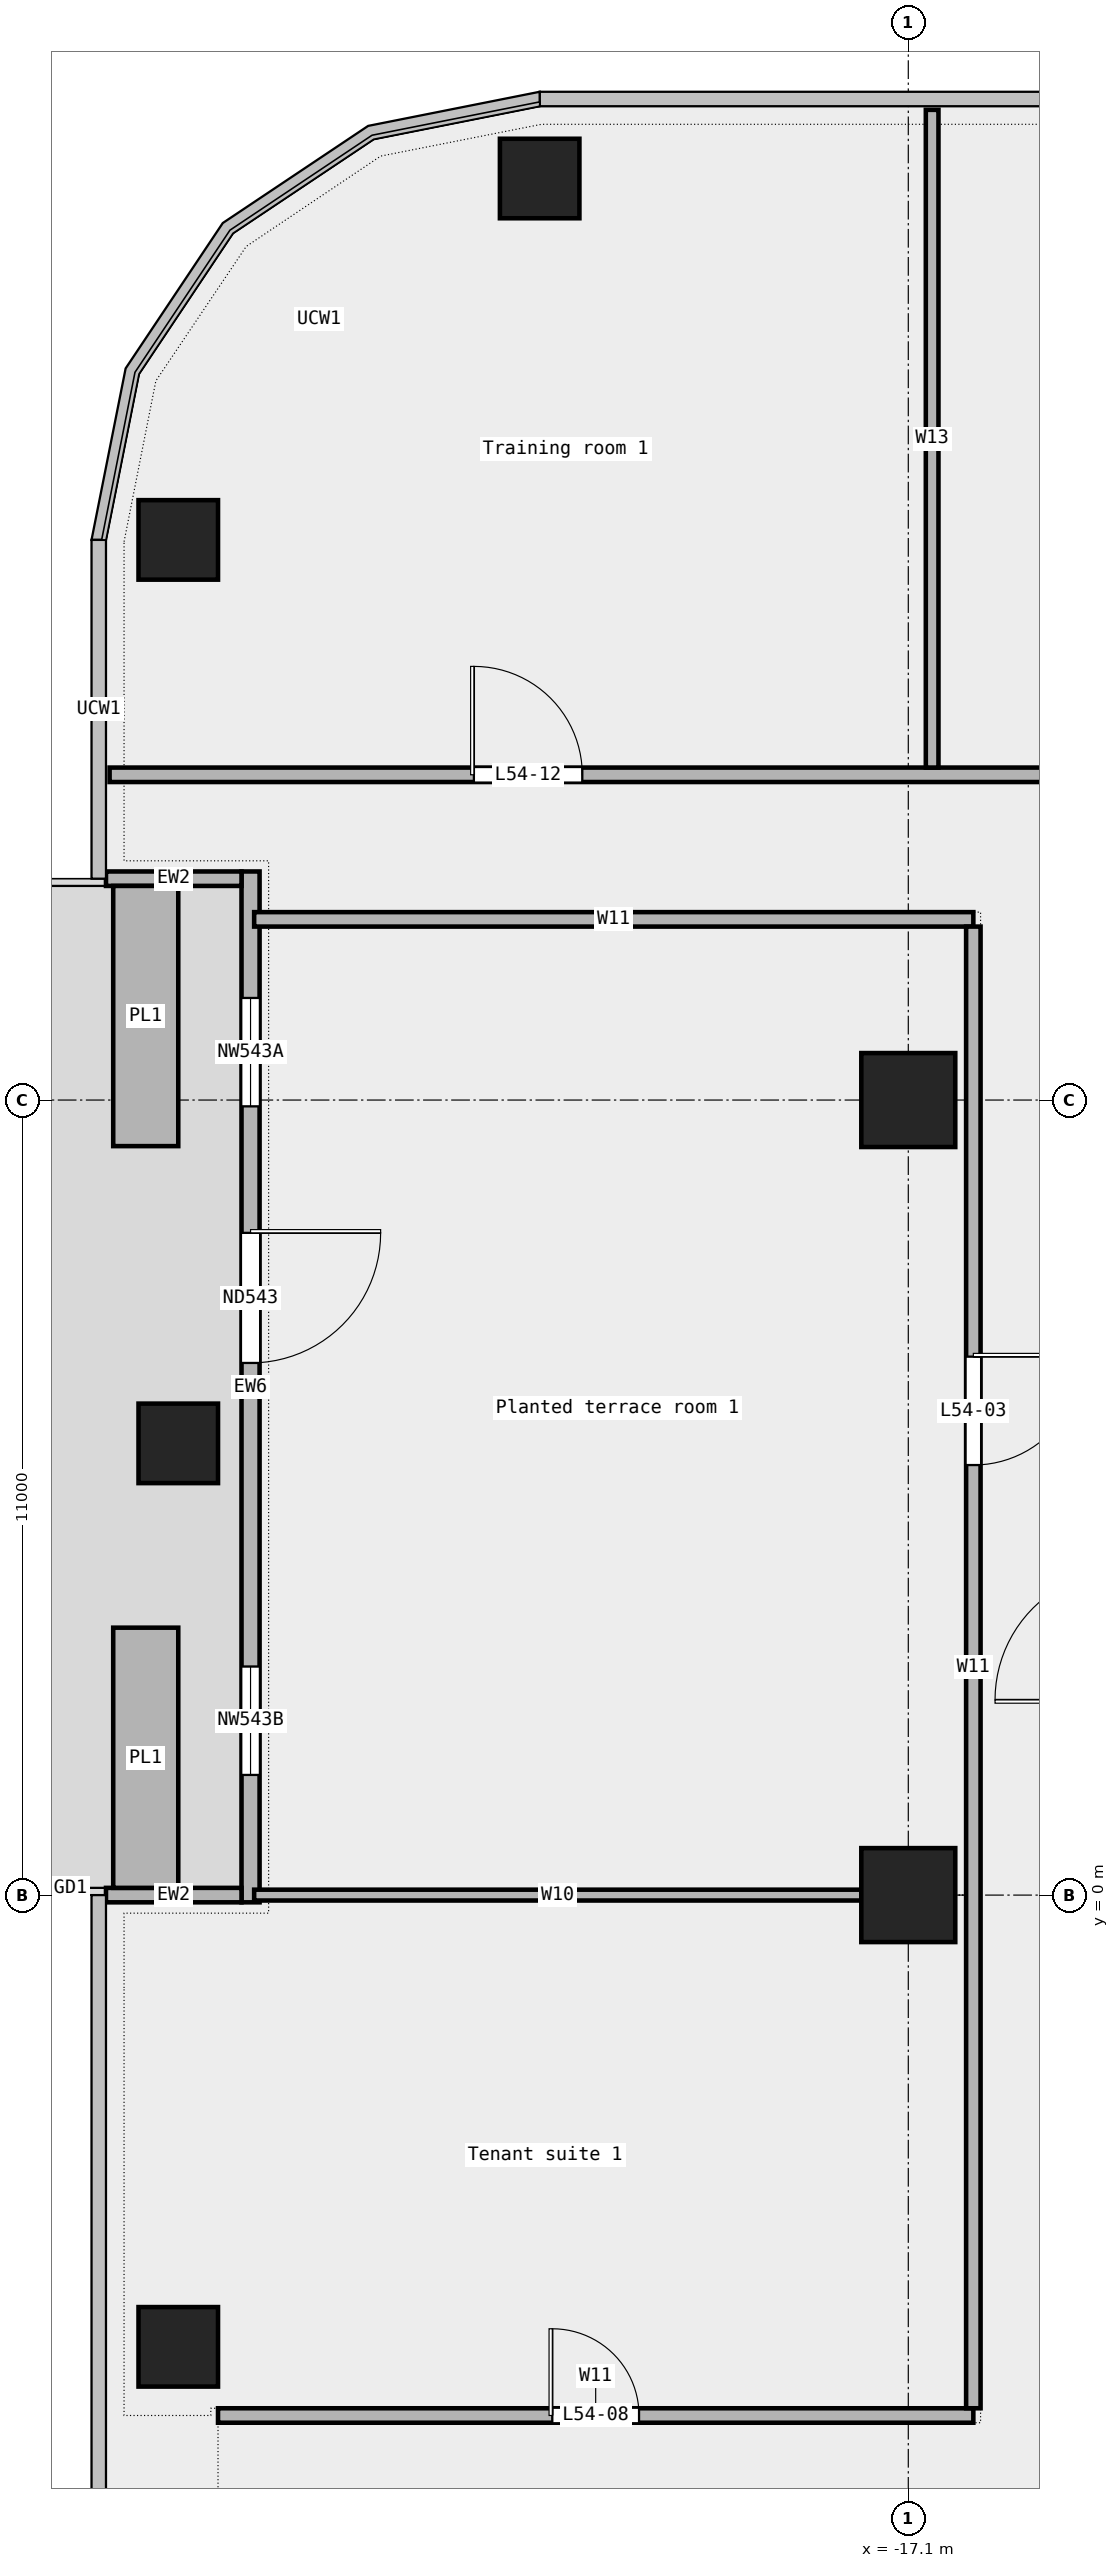
"""IFC4 building model, lengths in metres.
Left out: names, types, materials, properties, quantities, classifications, styles, units other than length and angle.
Written with IfcOpenShell. Run it as: python <this file> out.ifc"""

import sys

from ifc_helpers import new_model, si_unit, direction, frame, frame_2d, origin, origin_2d, place, context, subcontext, project, spatial, rectangle, extrude, element, fill, save


model = new_model("IFC4")
c1 = context("Model", 3, precision=1e-05, world=origin(), true_north=direction((0.0, 1.0)))
c2 = subcontext(c1, "Body", "Model", "MODEL_VIEW")
j1 = project(units=[si_unit("LENGTHUNIT", "METRE"), si_unit("PLANEANGLEUNIT", "RADIAN")], contexts=[c1])
p1 = place(None, origin())
s1 = spatial("IfcSite", under=j1, at=p1, CompositionType="ELEMENT")
p2 = place(p1, origin())
s2 = spatial("IfcBuilding", under=s1, at=p2, CompositionType="ELEMENT")
p3 = place(p2, frame((0.0, 0.0, 251.0)))
s3 = spatial("IfcBuildingStorey", under=s2, at=p3, CompositionType="ELEMENT", Elevation=251.0)
for number, where, z_axis, x_axis in (
    (1, (-22.2, 23.75, 0.0), (0.0, 0.0, 1.0), (1.0, 0.0, 0.0)),
    (2, (-27.2, 18.75, 0.0), (0.0, 0.0, 1.0), (1.0, 0.0, 0.0)),
    (3, (-27.2, 6.25, 0.0), (0.0, 0.0, 1.0), (1.0, 0.0, 0.0)),
    (4, (-27.2, -6.25, 0.0), (0.0, 0.0, 1.0), (1.0, 0.0, 0.0)),
):
    element("IfcColumn", number, at=place(p3, frame(where, z_axis=z_axis, x_axis=x_axis)), inside=s3, PredefinedType="COLUMN", context=c2, shape_type="SweptSolid", body=[
        extrude(rectangle(XDim=1.1, YDim=1.1, at=origin_2d()), origin(), (0.0, 0.0, 1.0), 3.6),
    ])
for number, where, z_axis, x_axis in (
    (5, (-17.1, 0.0, 0.0), (0.0, 0.0, 1.0), (1.0, 0.0, 0.0)),
    (6, (-17.1, 11.0, 0.0), (0.0, 0.0, 1.0), (1.0, 0.0, 0.0)),
):
    element("IfcColumn", number, at=place(p3, frame(where, z_axis=z_axis, x_axis=x_axis)), inside=s3, PredefinedType="COLUMN", context=c2, shape_type="SweptSolid", body=[
        extrude(rectangle(XDim=1.3, YDim=1.3, at=origin_2d()), origin(), (0.0, 0.0, 1.0), 3.6),
    ])
p4 = place(p3, frame((-26.2, 14.163, 0.0), z_axis=(0.0, 0.0, 1.0), x_axis=(0.0, -1.0, 0.0)))
e7 = element("IfcWall", 7, at=p4, inside=s3, PredefinedType="STANDARD", context=c2, shape_type="SweptSolid", body=[
    extrude(rectangle(XDim=14.263, YDim=0.25, at=frame_2d((7.131, 0.0))), origin(), (0.0, 0.0, 1.0), 3.6),
])
p5 = place(p4, frame((1.75, 0.0, 0.45)))
e8 = element("IfcOpeningElement", 8, at=p5, cuts=e7, PredefinedType="OPENING", context=c2, shape_type="SweptSolid", body=[
    extrude(rectangle(XDim=1.5, YDim=2.4, at=frame_2d((0.75, 1.2))), frame((0.0, 0.137, 0.0), z_axis=(0.0, -1.0, 0.0), x_axis=(1.0, 0.0, 0.0)), (0.0, 0.0, 1.0), 0.274),
])
p6 = place(p4, frame((5.0, 0.0, 0.0)))
e9 = element("IfcOpeningElement", 9, at=p6, cuts=e7, PredefinedType="OPENING", context=c2, shape_type="SweptSolid", body=[
    extrude(rectangle(XDim=1.8, YDim=2.4, at=frame_2d((0.9, 1.2))), frame((0.0, 0.137, 0.0), z_axis=(0.0, -1.0, 0.0), x_axis=(1.0, 0.0, 0.0)), (0.0, 0.0, 1.0), 0.274),
])
p7 = place(p4, frame((11.0, 0.0, 0.45)))
e10 = element("IfcOpeningElement", 10, at=p7, cuts=e7, PredefinedType="OPENING", context=c2, shape_type="SweptSolid", body=[
    extrude(rectangle(XDim=1.5, YDim=2.4, at=frame_2d((0.75, 1.2))), frame((0.0, 0.137, 0.0), z_axis=(0.0, -1.0, 0.0), x_axis=(1.0, 0.0, 0.0)), (0.0, 0.0, 1.0), 0.274),
])
for number, where, z_axis, x_axis in (
    (11, (-28.2, 14.062, 0.0), (0.0, 0.0, 1.0), (1.0, 0.0, 0.0)),
    (12, (-28.2, 0.0, 0.0), (0.0, 0.0, 1.0), (1.0, 0.0, 0.0)),
):
    element("IfcWall", number, at=place(p3, frame(where, z_axis=z_axis, x_axis=x_axis)), inside=s3, PredefinedType="STANDARD", context=c2, shape_type="SweptSolid", body=[
        extrude(rectangle(XDim=1.875, YDim=0.2, at=frame_2d((0.938, 0.0))), origin(), (0.0, 0.0, 1.0), 3.6),
    ])
for number, where, z_axis, x_axis in (
    (13, (-27.65, 13.962, 0.0), (0.0, 0.0, 1.0), (0.0, -1.0, 0.0)),
    (14, (-27.65, 3.7, 0.0), (0.0, 0.0, 1.0), (0.0, -1.0, 0.0)),
):
    element("IfcWall", number, at=place(p3, frame(where, z_axis=z_axis, x_axis=x_axis)), inside=s3, PredefinedType="STANDARD", context=c2, shape_type="SweptSolid", body=[
        extrude(rectangle(XDim=3.6, YDim=0.9, at=frame_2d((1.8, 0.0))), origin(), (0.0, 0.0, 1.0), 0.7),
    ])
p8 = place(p3, frame((-26.65, -7.2, 0.0), z_axis=(0.0, 0.0, 1.0), x_axis=(1.0, 0.0, 0.0)))
e15 = element("IfcWall", 15, at=p8, inside=s3, PredefinedType="PARTITIONING", context=c2, shape_type="SweptSolid", body=[
    extrude(rectangle(XDim=10.45, YDim=0.2, at=frame_2d((5.225, 0.0))), origin(), (0.0, 0.0, 1.0), 3.6),
])
p9 = place(p8, frame((4.625, 0.0, 0.0)))
e16 = element("IfcOpeningElement", 16, at=p9, cuts=e15, PredefinedType="OPENING", context=c2, shape_type="SweptSolid", body=[
    extrude(rectangle(XDim=1.2, YDim=2.1, at=frame_2d((0.6, 1.05))), frame((0.0, 0.112, 0.0), z_axis=(0.0, -1.0, 0.0), x_axis=(1.0, 0.0, 0.0)), (0.0, 0.0, 1.0), 0.224),
])
p10 = place(p3, frame((-26.15, 0.0, 0.0), z_axis=(0.0, 0.0, 1.0), x_axis=(1.0, 0.0, 0.0)))
e17 = element("IfcWall", 17, at=p10, inside=s3, PredefinedType="PARTITIONING", context=c2, shape_type="SweptSolid", body=[
    extrude(rectangle(XDim=8.4, YDim=0.15, at=frame_2d((4.2, 0.0))), origin(), (0.0, 0.0, 1.0), 3.6),
])
p11 = place(p3, frame((-26.15, 13.5, 0.0), z_axis=(0.0, 0.0, 1.0), x_axis=(1.0, 0.0, 0.0)))
e18 = element("IfcWall", 18, at=p11, inside=s3, PredefinedType="PARTITIONING", context=c2, shape_type="SweptSolid", body=[
    extrude(rectangle(XDim=9.95, YDim=0.2, at=frame_2d((4.975, 0.0))), origin(), (0.0, 0.0, 1.0), 3.6),
])
p12 = place(p3, frame((-28.15, 15.5, 0.0), z_axis=(0.0, 0.0, 1.0), x_axis=(1.0, 0.0, 0.0)))
e19 = element("IfcWall", 19, at=p12, inside=s3, PredefinedType="PARTITIONING", context=c2, shape_type="SweptSolid", body=[
    extrude(rectangle(XDim=56.3, YDim=0.2, at=frame_2d((28.15, 0.0))), origin(), (0.0, 0.0, 1.0), 3.6),
])
p13 = place(p12, frame((50.405, 0.0, 0.0)))
e20 = element("IfcOpeningElement", 20, at=p13, cuts=e19, PredefinedType="OPENING", context=c2, shape_type="SweptSolid", body=[
    extrude(rectangle(XDim=1.2, YDim=2.1, at=frame_2d((0.6, 1.05))), frame((0.0, 0.112, 0.0), z_axis=(0.0, -1.0, 0.0), x_axis=(1.0, 0.0, 0.0)), (0.0, 0.0, 1.0), 0.224),
])
p14 = place(p12, frame((38.5, 0.0, 0.0)))
e21 = element("IfcOpeningElement", 21, at=p14, cuts=e19, PredefinedType="OPENING", context=c2, shape_type="SweptSolid", body=[
    extrude(rectangle(XDim=1.5, YDim=2.1, at=frame_2d((0.75, 1.05))), frame((0.0, 0.112, 0.0), z_axis=(0.0, -1.0, 0.0), x_axis=(1.0, 0.0, 0.0)), (0.0, 0.0, 1.0), 0.224),
])
p15 = place(p12, frame((30.853, 0.0, 0.0)))
e22 = element("IfcOpeningElement", 22, at=p15, cuts=e19, PredefinedType="OPENING", context=c2, shape_type="SweptSolid", body=[
    extrude(rectangle(XDim=0.9, YDim=2.1, at=frame_2d((0.45, 1.05))), frame((0.0, 0.112, 0.0), z_axis=(0.0, -1.0, 0.0), x_axis=(1.0, 0.0, 0.0)), (0.0, 0.0, 1.0), 0.224),
])
p16 = place(p12, frame((19.798, 0.0, 0.0)))
e23 = element("IfcOpeningElement", 23, at=p16, cuts=e19, PredefinedType="OPENING", context=c2, shape_type="SweptSolid", body=[
    extrude(rectangle(XDim=1.8, YDim=2.1, at=frame_2d((0.9, 1.05))), frame((0.0, 0.112, 0.0), z_axis=(0.0, -1.0, 0.0), x_axis=(1.0, 0.0, 0.0)), (0.0, 0.0, 1.0), 0.224),
])
p17 = place(p12, frame((5.04, 0.0, 0.0)))
e24 = element("IfcOpeningElement", 24, at=p17, cuts=e19, PredefinedType="OPENING", context=c2, shape_type="SweptSolid", body=[
    extrude(rectangle(XDim=1.5, YDim=2.1, at=frame_2d((0.75, 1.05))), frame((0.0, 0.112, 0.0), z_axis=(0.0, -1.0, 0.0), x_axis=(1.0, 0.0, 0.0)), (0.0, 0.0, 1.0), 0.224),
])
p18 = place(p3, frame((-16.77, 15.6, 0.0), z_axis=(0.0, 0.0, 1.0), x_axis=(0.0, 1.0, 0.0)))
e25 = element("IfcWall", 25, at=p18, inside=s3, PredefinedType="PARTITIONING", context=c2, shape_type="SweptSolid", body=[
    extrude(rectangle(XDim=9.1, YDim=0.175, at=frame_2d((4.55, 0.0))), origin(), (0.0, 0.0, 1.0), 3.6),
])
p19 = place(p3, frame((-16.2, -7.1, 0.0), z_axis=(0.0, 0.0, 1.0), x_axis=(0.0, 1.0, 0.0)))
e26 = element("IfcWall", 26, at=p19, inside=s3, PredefinedType="PARTITIONING", context=c2, shape_type="SweptSolid", body=[
    extrude(rectangle(XDim=20.5, YDim=0.2, at=frame_2d((10.25, 0.0))), origin(), (0.0, 0.0, 1.0), 3.6),
])
p20 = place(p19, frame((13.05, 0.0, 0.0)))
e27 = element("IfcOpeningElement", 27, at=p20, cuts=e26, PredefinedType="OPENING", context=c2, shape_type="SweptSolid", body=[
    extrude(rectangle(XDim=1.5, YDim=2.1, at=frame_2d((0.75, 1.05))), frame((0.0, 0.112, 0.0), z_axis=(0.0, -1.0, 0.0), x_axis=(1.0, 0.0, 0.0)), (0.0, 0.0, 1.0), 0.224),
])
p21 = place(p5, origin())
e28 = element("IfcWindow", 28, at=p21, inside=s3, PartitioningType="SINGLE_PANEL", PredefinedType="WINDOW", context=c2, shape_type="SweptSolid", body=[
    extrude(rectangle(XDim=1.5, YDim=2.4, at=frame_2d((0.75, 1.2))), frame((0.0, 0.03, 0.0), z_axis=(0.0, -1.0, 0.0), x_axis=(1.0, 0.0, 0.0)), (0.0, 0.0, 1.0), 0.06),
])
fill(e8, e28)
p22 = place(p6, origin())
e29 = element("IfcDoor", 29, at=p22, inside=s3, OperationType="DOUBLE_DOOR_SINGLE_SWING", PredefinedType="DOOR", context=c2, shape_type="SweptSolid", body=[
    extrude(rectangle(XDim=1.8, YDim=2.4, at=frame_2d((0.9, 1.2))), frame((0.0, 0.025, 0.0), z_axis=(0.0, -1.0, 0.0), x_axis=(1.0, 0.0, 0.0)), (0.0, 0.0, 1.0), 0.05),
])
fill(e9, e29)
p23 = place(p7, origin())
e30 = element("IfcWindow", 30, at=p23, inside=s3, PartitioningType="SINGLE_PANEL", PredefinedType="WINDOW", context=c2, shape_type="SweptSolid", body=[
    extrude(rectangle(XDim=1.5, YDim=2.4, at=frame_2d((0.75, 1.2))), frame((0.0, 0.03, 0.0), z_axis=(0.0, -1.0, 0.0), x_axis=(1.0, 0.0, 0.0)), (0.0, 0.0, 1.0), 0.06),
])
fill(e10, e30)
p24 = place(p20, origin())
e31 = element("IfcDoor", 31, at=p24, inside=s3, OperationType="DOUBLE_DOOR_SINGLE_SWING", PredefinedType="DOOR", context=c2, shape_type="SweptSolid", body=[
    extrude(rectangle(XDim=1.5, YDim=2.1, at=frame_2d((0.75, 1.05))), frame((0.0, 0.025, 0.0), z_axis=(0.0, -1.0, 0.0), x_axis=(1.0, 0.0, 0.0)), (0.0, 0.0, 1.0), 0.05),
])
fill(e27, e31)
p25 = place(p9, origin())
e32 = element("IfcDoor", 32, at=p25, inside=s3, OperationType="SINGLE_SWING_LEFT", PredefinedType="DOOR", context=c2, shape_type="SweptSolid", body=[
    extrude(rectangle(XDim=1.2, YDim=2.1, at=frame_2d((0.6, 1.05))), frame((0.0, 0.025, 0.0), z_axis=(0.0, -1.0, 0.0), x_axis=(1.0, 0.0, 0.0)), (0.0, 0.0, 1.0), 0.05),
])
fill(e16, e32)
p26 = place(p17, origin())
e33 = element("IfcDoor", 33, at=p26, inside=s3, OperationType="DOUBLE_DOOR_SINGLE_SWING", PredefinedType="DOOR", context=c2, shape_type="SweptSolid", body=[
    extrude(rectangle(XDim=1.5, YDim=2.1, at=frame_2d((0.75, 1.05))), frame((0.0, 0.025, 0.0), z_axis=(0.0, -1.0, 0.0), x_axis=(1.0, 0.0, 0.0)), (0.0, 0.0, 1.0), 0.05),
])
fill(e24, e33)
save(model, sys.argv[1])
